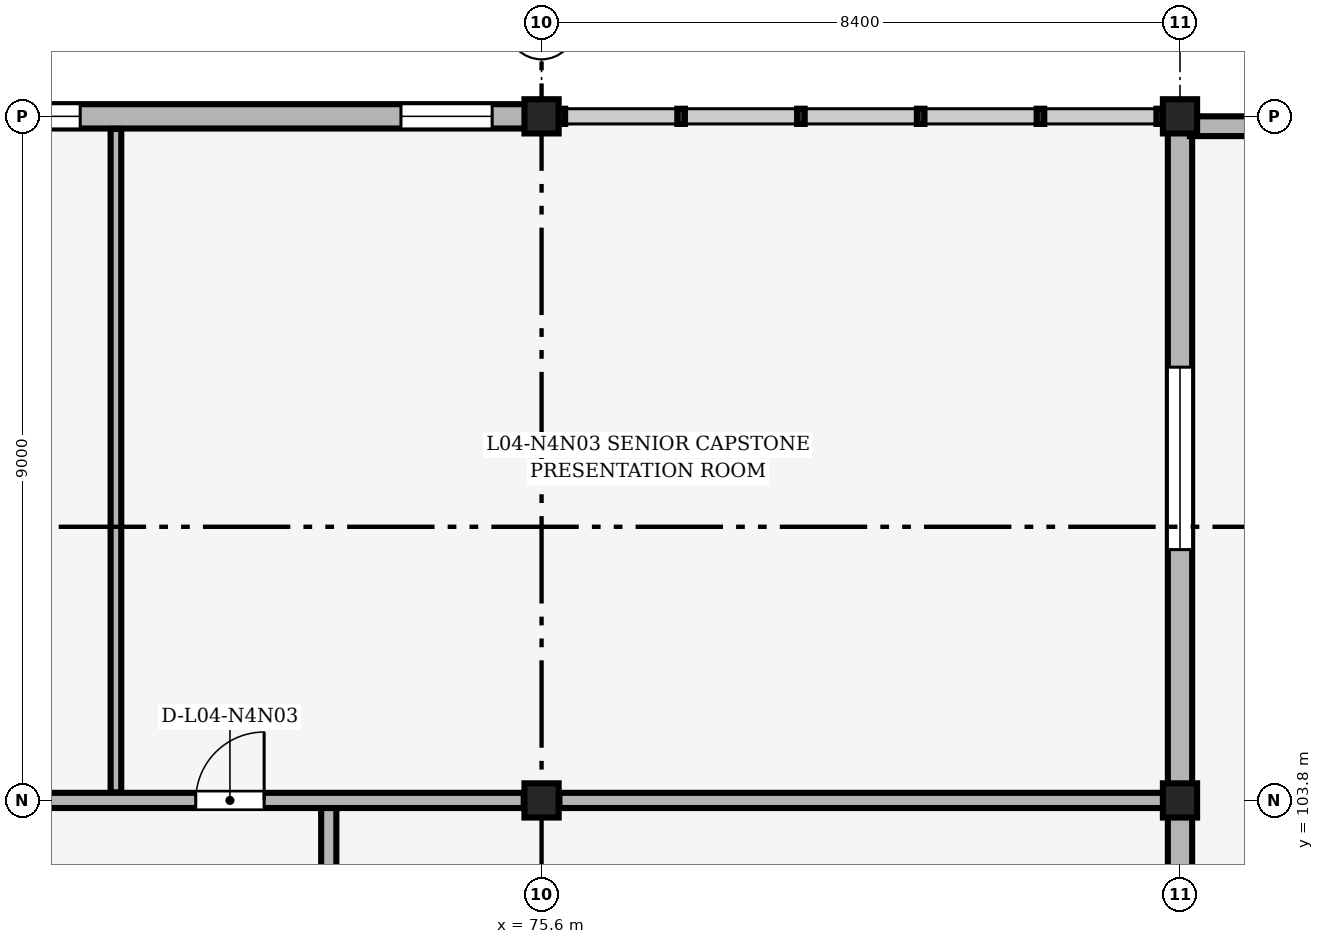
"""IFC4 building model, lengths in metres.
Left out: names, types, materials, properties, quantities, classifications, styles, units other than length and angle.
Written with IfcOpenShell. Run it as: python <this file> out.ifc"""

import sys

from ifc_helpers import new_model, si_unit, direction, frame, frame_2d, origin, origin_2d, place, context, subcontext, project, spatial, rectangle, extrude, element, fill, save


model = new_model("IFC4")
c1 = context("Model", 3, precision=1e-05, world=origin(), true_north=direction((0.0, 1.0)))
c2 = subcontext(c1, "Body", "Model", "MODEL_VIEW")
j1 = project(units=[si_unit("LENGTHUNIT", "METRE"), si_unit("PLANEANGLEUNIT", "RADIAN")], contexts=[c1])
p1 = place(None, origin())
s1 = spatial("IfcSite", under=j1, at=p1, CompositionType="ELEMENT")
p2 = place(p1, origin())
s2 = spatial("IfcBuilding", under=s1, at=p2, CompositionType="ELEMENT")
p3 = place(p2, frame((0.0, 0.0, 17.4)))
s3 = spatial("IfcBuildingStorey", under=s2, at=p3, CompositionType="ELEMENT", Elevation=17.4)
for number, where, z_axis, x_axis in (
    (1, (75.6, 103.8, 0.0), (0.0, 0.0, 1.0), (1.0, 0.0, 0.0)),
    (2, (75.6, 112.8, 0.0), (0.0, 0.0, 1.0), (1.0, 0.0, 0.0)),
    (3, (84.0, 103.8, 0.0), (0.0, 0.0, 1.0), (1.0, 0.0, 0.0)),
    (4, (84.0, 112.8, 0.0), (0.0, 0.0, 1.0), (1.0, 0.0, 0.0)),
):
    element("IfcColumn", number, at=place(p3, frame(where, z_axis=z_axis, x_axis=x_axis)), inside=s3, PredefinedType="COLUMN", context=c2, shape_type="SweptSolid", body=[
        extrude(rectangle(XDim=0.45, YDim=0.45, at=origin_2d()), origin(), (0.0, 0.0, 1.0), 4.2),
    ])
p4 = place(p3, frame((84.0, 95.0, 0.0), z_axis=(0.0, 0.0, 1.0), x_axis=(0.0, 1.0, 0.0)))
e5 = element("IfcWall", 5, at=p4, inside=s3, PredefinedType="SOLIDWALL", context=c2, shape_type="SweptSolid", body=[
    extrude(rectangle(XDim=8.6, YDim=0.32, at=frame_2d((4.3, 0.0))), origin(), (0.0, 0.0, 1.0), 3.48),
])
p5 = place(p4, frame((3.1, 0.0, 0.9)))
e6 = element("IfcOpeningElement", 6, at=p5, cuts=e5, PredefinedType="OPENING", context=c2, shape_type="SweptSolid", body=[
    extrude(rectangle(XDim=2.4, YDim=1.8, at=frame_2d((1.2, 0.9))), frame((0.0, 0.17, 0.0), z_axis=(0.0, -1.0, 0.0), x_axis=(1.0, 0.0, 0.0)), (0.0, 0.0, 1.0), 0.34),
])
p6 = place(p3, frame((84.0, 104.0, 0.0), z_axis=(0.0, 0.0, 1.0), x_axis=(0.0, 1.0, 0.0)))
e7 = element("IfcWall", 7, at=p6, inside=s3, PredefinedType="SOLIDWALL", context=c2, shape_type="SweptSolid", body=[
    extrude(rectangle(XDim=8.6, YDim=0.32, at=frame_2d((4.3, 0.0))), origin(), (0.0, 0.0, 1.0), 3.43),
])
p7 = place(p6, frame((3.1, 0.0, 0.9)))
e8 = element("IfcOpeningElement", 8, at=p7, cuts=e7, PredefinedType="OPENING", context=c2, shape_type="SweptSolid", body=[
    extrude(rectangle(XDim=2.4, YDim=1.8, at=frame_2d((1.2, 0.9))), frame((0.0, 0.17, 0.0), z_axis=(0.0, -1.0, 0.0), x_axis=(1.0, 0.0, 0.0)), (0.0, 0.0, 1.0), 0.34),
])
p8 = place(p3, frame((67.4, 112.8, 0.0), z_axis=(0.0, 0.0, 1.0), x_axis=(1.0, 0.0, 0.0)))
e9 = element("IfcWall", 9, at=p8, inside=s3, PredefinedType="SOLIDWALL", context=c2, shape_type="SweptSolid", body=[
    extrude(rectangle(XDim=8.0, YDim=0.32, at=frame_2d((4.0, 0.0))), origin(), (0.0, 0.0, 1.0), 3.43),
])
p9 = place(p8, frame((0.45, 0.0, 0.9)))
e10 = element("IfcOpeningElement", 10, at=p9, cuts=e9, PredefinedType="OPENING", context=c2, shape_type="SweptSolid", body=[
    extrude(rectangle(XDim=1.68, YDim=2.4, at=frame_2d((0.84, 1.2))), frame((0.0, 0.17, 0.0), z_axis=(0.0, -1.0, 0.0), x_axis=(1.0, 0.0, 0.0)), (0.0, 0.0, 1.0), 0.34),
])
p10 = place(p8, frame((6.35, 0.0, 0.9)))
e11 = element("IfcOpeningElement", 11, at=p10, cuts=e9, PredefinedType="OPENING", context=c2, shape_type="SweptSolid", body=[
    extrude(rectangle(XDim=1.2, YDim=1.5, at=frame_2d((0.6, 0.75))), frame((0.0, 0.17, 0.0), z_axis=(0.0, -1.0, 0.0), x_axis=(1.0, 0.0, 0.0)), (0.0, 0.0, 1.0), 0.34),
])
p11 = place(p3, frame((84.13, 112.67, 0.0), z_axis=(0.0, 0.0, 1.0), x_axis=(1.0, 0.0, 0.0)))
e12 = element("IfcWall", 12, at=p11, inside=s3, PredefinedType="PARAPET", context=c2, shape_type="SweptSolid", body=[
    extrude(rectangle(XDim=33.34, YDim=0.26, at=frame_2d((16.67, 0.0))), origin(), (0.0, 0.0, 1.0), 0.85),
])
p12 = place(p3, frame((72.8, 101.01, 0.0), z_axis=(0.0, 0.0, 1.0), x_axis=(0.0, 1.0, 0.0)))
e13 = element("IfcWall", 13, at=p12, inside=s3, PredefinedType="PARTITIONING", context=c2, shape_type="SweptSolid", body=[
    extrude(rectangle(XDim=2.78, YDim=0.2, at=frame_2d((1.39, 0.0))), origin(), (0.0, 0.0, 1.0), 3.9),
])
p13 = place(p12, frame((0.94, 0.0, 0.0)))
e14 = element("IfcOpeningElement", 14, at=p13, cuts=e13, PredefinedType="OPENING", context=c2, shape_type="SweptSolid", body=[
    extrude(rectangle(XDim=0.9, YDim=2.1, at=frame_2d((0.45, 1.05))), frame((0.0, 0.11, 0.0), z_axis=(0.0, -1.0, 0.0), x_axis=(1.0, 0.0, 0.0)), (0.0, 0.0, 1.0), 0.22),
])
p14 = place(p3, frame((70.0, 103.905, 0.0), z_axis=(0.0, 0.0, 1.0), x_axis=(0.0, 1.0, 0.0)))
e15 = element("IfcWall", 15, at=p14, inside=s3, PredefinedType="PARTITIONING", context=c2, shape_type="SweptSolid", body=[
    extrude(rectangle(XDim=8.73, YDim=0.14, at=frame_2d((4.365, 0.0))), origin(), (0.0, 0.0, 1.0), 3.9),
])
p15 = place(p3, frame((67.435, 103.8, 0.0), z_axis=(0.0, 0.0, 1.0), x_axis=(1.0, 0.0, 0.0)))
e16 = element("IfcWall", 16, at=p15, inside=s3, PredefinedType="PARTITIONING", context=c2, shape_type="SweptSolid", body=[
    extrude(rectangle(XDim=7.93, YDim=0.2, at=frame_2d((3.965, 0.0))), origin(), (0.0, 0.0, 1.0), 3.48),
])
p16 = place(p15, frame((3.615, 0.0, 0.0)))
e17 = element("IfcOpeningElement", 17, at=p16, cuts=e16, PredefinedType="OPENING", context=c2, shape_type="SweptSolid", body=[
    extrude(rectangle(XDim=0.9, YDim=2.1, at=frame_2d((0.45, 1.05))), frame((0.0, 0.11, 0.0), z_axis=(0.0, -1.0, 0.0), x_axis=(1.0, 0.0, 0.0)), (0.0, 0.0, 1.0), 0.22),
])
p17 = place(p3, frame((75.835, 103.8, 0.0), z_axis=(0.0, 0.0, 1.0), x_axis=(1.0, 0.0, 0.0)))
e18 = element("IfcWall", 18, at=p17, inside=s3, PredefinedType="PARTITIONING", context=c2, shape_type="SweptSolid", body=[
    extrude(rectangle(XDim=8.0, YDim=0.2, at=frame_2d((4.0, 0.0))), origin(), (0.0, 0.0, 1.0), 3.43),
])
p18 = place(p7, origin())
e19 = element("IfcWindow", 19, at=p18, inside=s3, PartitioningType="SINGLE_PANEL", PredefinedType="WINDOW", context=c2, shape_type="SweptSolid", body=[
    extrude(rectangle(XDim=2.4, YDim=1.8, at=frame_2d((1.2, 0.9))), frame((0.0, 0.03, 0.0), z_axis=(0.0, -1.0, 0.0), x_axis=(1.0, 0.0, 0.0)), (0.0, 0.0, 1.0), 0.06),
])
fill(e8, e19)
p19 = place(p9, origin())
e20 = element("IfcWindow", 20, at=p19, inside=s3, PartitioningType="SINGLE_PANEL", PredefinedType="WINDOW", context=c2, shape_type="SweptSolid", body=[
    extrude(rectangle(XDim=1.68, YDim=2.4, at=frame_2d((0.84, 1.2))), frame((0.0, 0.03, 0.0), z_axis=(0.0, -1.0, 0.0), x_axis=(1.0, 0.0, 0.0)), (0.0, 0.0, 1.0), 0.06),
])
fill(e10, e20)
p20 = place(p10, origin())
e21 = element("IfcWindow", 21, at=p20, inside=s3, PartitioningType="SINGLE_PANEL", PredefinedType="WINDOW", context=c2, shape_type="SweptSolid", body=[
    extrude(rectangle(XDim=1.2, YDim=1.5, at=frame_2d((0.6, 0.75))), frame((0.0, 0.03, 0.0), z_axis=(0.0, -1.0, 0.0), x_axis=(1.0, 0.0, 0.0)), (0.0, 0.0, 1.0), 0.06),
])
fill(e11, e21)
p21 = place(p16, origin())
e22 = element("IfcDoor", 22, at=p21, inside=s3, OperationType="SINGLE_SWING_RIGHT", PredefinedType="DOOR", context=c2, shape_type="SweptSolid", body=[
    extrude(rectangle(XDim=0.9, YDim=2.1, at=frame_2d((0.45, 1.05))), frame((0.0, 0.025, 0.0), z_axis=(0.0, -1.0, 0.0), x_axis=(1.0, 0.0, 0.0)), (0.0, 0.0, 1.0), 0.05),
])
fill(e17, e22)
save(model, sys.argv[1])
